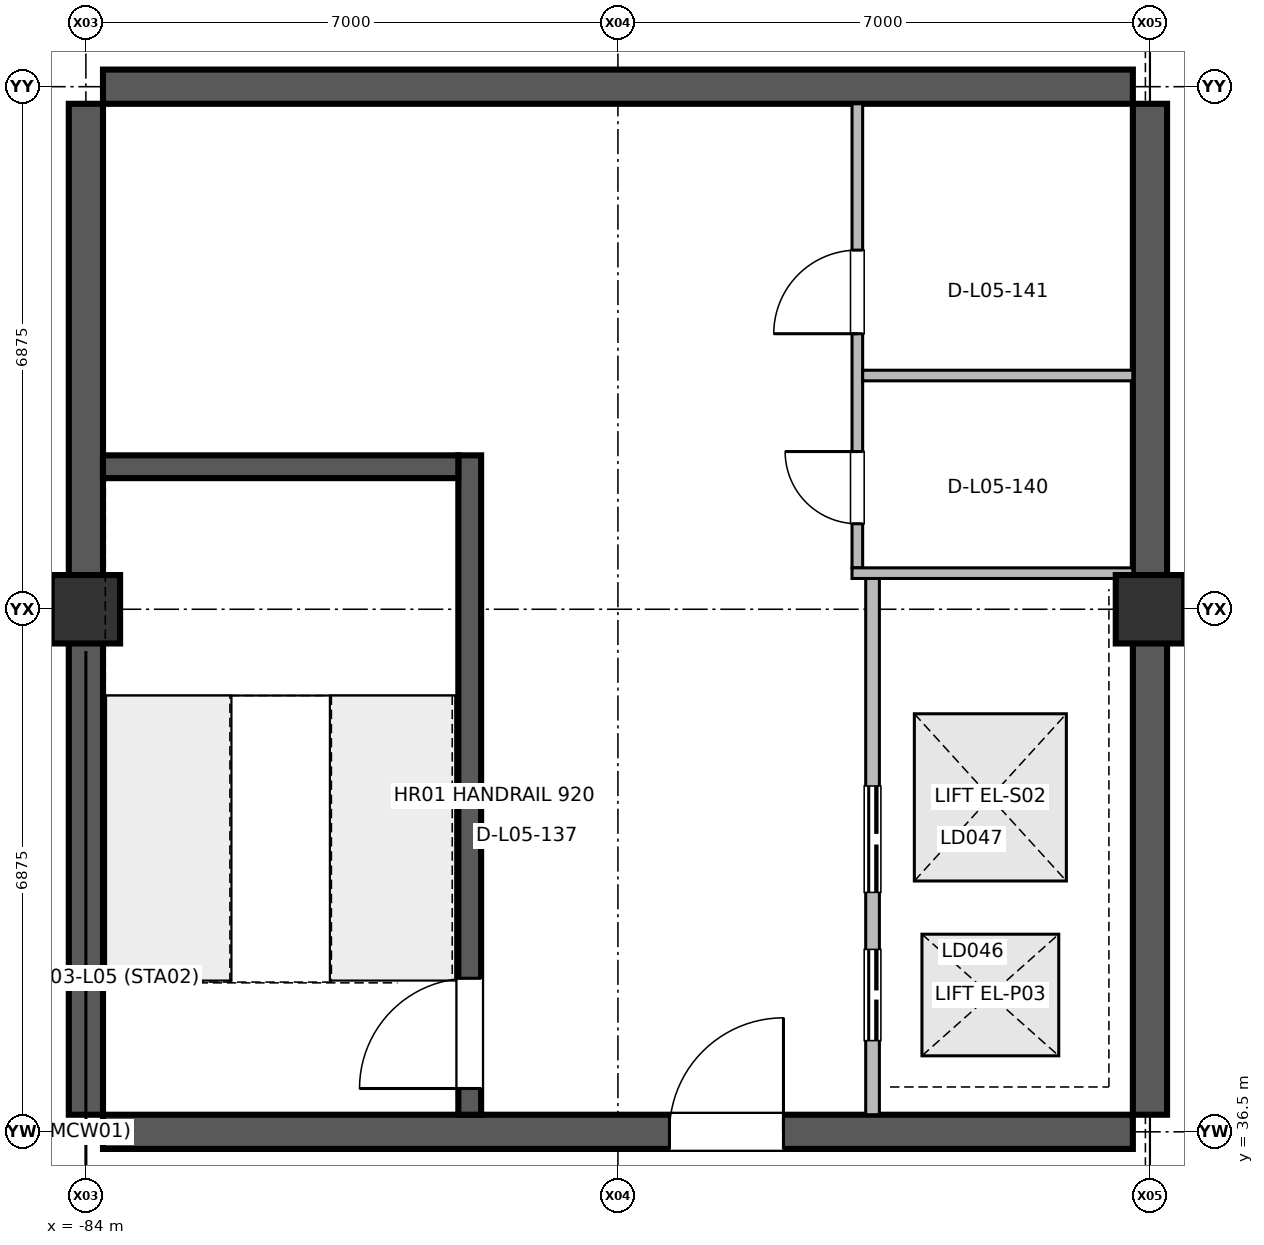
"""IFC4 building model, lengths in metres.
Left out: names, types, materials, properties, quantities, classifications, styles, units other than length and angle.
Written with IfcOpenShell. Run it as: python <this file> out.ifc"""

import sys

from ifc_helpers import new_model, si_unit, direction, frame, frame_2d, origin, origin_2d, place, context, subcontext, project, spatial, rectangle, extrude, element, fill, save


model = new_model("IFC4")
c1 = context("Model", 3, precision=1e-05, world=origin(), true_north=direction((0.0, 1.0)))
c2 = subcontext(c1, "Body", "Model", "MODEL_VIEW")
j1 = project(units=[si_unit("LENGTHUNIT", "METRE"), si_unit("PLANEANGLEUNIT", "RADIAN")], contexts=[c1])
p1 = place(None, origin())
s1 = spatial("IfcSite", under=j1, at=p1, CompositionType="ELEMENT")
p2 = place(p1, origin())
s2 = spatial("IfcBuilding", under=s1, at=p2, CompositionType="ELEMENT")
p3 = place(p2, frame((0.0, 0.0, 21.0)))
s3 = spatial("IfcBuildingStorey", under=s2, at=p3, CompositionType="ELEMENT", Elevation=21.0)
for number, where, z_axis, x_axis in (
    (1, (-84.0, 43.375, 0.0), (0.0, 0.0, 1.0), (1.0, 0.0, 0.0)),
    (2, (-70.0, 43.375, 0.0), (0.0, 0.0, 1.0), (1.0, 0.0, 0.0)),
):
    element("IfcColumn", number, at=place(p3, frame(where, z_axis=z_axis, x_axis=x_axis)), inside=s3, PredefinedType="COLUMN", context=c2, shape_type="SweptSolid", body=[
        extrude(rectangle(XDim=0.9, YDim=0.9, at=origin_2d()), origin(), (0.0, 0.0, 1.0), 5.398),
    ])
for number, where, z_axis, x_axis in (
    (3, (-84.0, 36.725, 0.0), (0.0, 0.0, 1.0), (0.0, 1.0, 0.0)),
    (4, (-70.0, 36.725, 0.0), (0.0, 0.0, 1.0), (0.0, 1.0, 0.0)),
):
    element("IfcWall", number, at=place(p3, frame(where, z_axis=z_axis, x_axis=x_axis)), inside=s3, PredefinedType="SHEAR", context=c2, shape_type="SweptSolid", body=[
        extrude(rectangle(XDim=13.3, YDim=0.45, at=frame_2d((6.65, 0.0))), origin(), (0.0, 0.0, 1.0), 5.22),
    ])
p4 = place(p3, frame((-83.775, 36.5, 0.0), z_axis=(0.0, 0.0, 1.0), x_axis=(1.0, 0.0, 0.0)))
e5 = element("IfcWall", 5, at=p4, inside=s3, PredefinedType="SHEAR", context=c2, shape_type="SweptSolid", body=[
    extrude(rectangle(XDim=13.55, YDim=0.45, at=frame_2d((6.775, 0.0))), origin(), (0.0, 0.0, 1.0), 5.22),
])
p5 = place(p4, frame((7.453, 0.0, 0.0)))
e6 = element("IfcOpeningElement", 6, at=p5, cuts=e5, PredefinedType="OPENING", context=c2, shape_type="SweptSolid", body=[
    extrude(rectangle(XDim=1.5, YDim=2.2, at=frame_2d((0.75, 1.1))), frame((0.0, 0.235, 0.0), z_axis=(0.0, -1.0, 0.0), x_axis=(1.0, 0.0, 0.0)), (0.0, 0.0, 1.0), 0.47),
])
p6 = place(p3, frame((-83.775, 50.25, 0.0), z_axis=(0.0, 0.0, 1.0), x_axis=(1.0, 0.0, 0.0)))
e7 = element("IfcWall", 7, at=p6, inside=s3, PredefinedType="SHEAR", context=c2, shape_type="SweptSolid", body=[
    extrude(rectangle(XDim=13.55, YDim=0.45, at=frame_2d((6.775, 0.0))), origin(), (0.0, 0.0, 1.0), 5.22),
])
p7 = place(p3, frame((-78.95, 36.725, 0.0), z_axis=(0.0, 0.0, 1.0), x_axis=(0.0, 1.0, 0.0)))
e8 = element("IfcWall", 8, at=p7, inside=s3, PredefinedType="SHEAR", context=c2, shape_type="SweptSolid", body=[
    extrude(rectangle(XDim=8.675, YDim=0.3, at=frame_2d((4.337, 0.0))), origin(), (0.0, 0.0, 1.0), 5.22),
])
p8 = place(p7, frame((0.345, 0.0, 0.0)))
e9 = element("IfcOpeningElement", 9, at=p8, cuts=e8, PredefinedType="OPENING", context=c2, shape_type="SweptSolid", body=[
    extrude(rectangle(XDim=1.45, YDim=2.2, at=frame_2d((0.725, 1.1))), frame((0.0, 0.16, 0.0), z_axis=(0.0, -1.0, 0.0), x_axis=(1.0, 0.0, 0.0)), (0.0, 0.0, 1.0), 0.32),
])
p9 = place(p3, frame((-73.65, 36.725, 0.0), z_axis=(0.0, 0.0, 1.0), x_axis=(0.0, 1.0, 0.0)))
e10 = element("IfcWall", 10, at=p9, inside=s3, PredefinedType="PARTITIONING", context=c2, shape_type="SweptSolid", body=[
    extrude(rectangle(XDim=7.055, YDim=0.18, at=frame_2d((3.527, 0.0))), origin(), (0.0, 0.0, 1.0), 4.42),
])
p10 = place(p9, frame((0.975, 0.0, 0.0)))
e11 = element("IfcOpeningElement", 11, at=p10, cuts=e10, PredefinedType="OPENING", context=c2, shape_type="SweptSolid", body=[
    extrude(rectangle(XDim=1.2, YDim=2.25, at=frame_2d((0.6, 1.125))), frame((0.0, 0.1, 0.0), z_axis=(0.0, -1.0, 0.0), x_axis=(1.0, 0.0, 0.0)), (0.0, 0.0, 1.0), 0.2),
])
p11 = place(p9, frame((2.925, 0.0, 0.0)))
e12 = element("IfcOpeningElement", 12, at=p11, cuts=e10, PredefinedType="OPENING", context=c2, shape_type="SweptSolid", body=[
    extrude(rectangle(XDim=1.4, YDim=2.3, at=frame_2d((0.7, 1.15))), frame((0.0, 0.1, 0.0), z_axis=(0.0, -1.0, 0.0), x_axis=(1.0, 0.0, 0.0)), (0.0, 0.0, 1.0), 0.2),
])
p12 = place(p3, frame((-73.85, 43.92, 0.0), z_axis=(0.0, 0.0, 1.0), x_axis=(0.0, 1.0, 0.0)))
e13 = element("IfcWall", 13, at=p12, inside=s3, PredefinedType="PARTITIONING", context=c2, shape_type="SweptSolid", body=[
    extrude(rectangle(XDim=6.105, YDim=0.14, at=frame_2d((3.052, 0.0))), origin(), (0.0, 0.0, 1.0), 4.42),
])
p13 = place(p12, frame((0.58, 0.0, 0.0)))
e14 = element("IfcOpeningElement", 14, at=p13, cuts=e13, PredefinedType="OPENING", context=c2, shape_type="SweptSolid", body=[
    extrude(rectangle(XDim=0.95, YDim=2.15, at=frame_2d((0.475, 1.075))), frame((0.0, 0.08, 0.0), z_axis=(0.0, -1.0, 0.0), x_axis=(1.0, 0.0, 0.0)), (0.0, 0.0, 1.0), 0.16),
])
p14 = place(p12, frame((3.08, 0.0, 0.0)))
e15 = element("IfcOpeningElement", 15, at=p14, cuts=e13, PredefinedType="OPENING", context=c2, shape_type="SweptSolid", body=[
    extrude(rectangle(XDim=1.1, YDim=2.15, at=frame_2d((0.55, 1.075))), frame((0.0, 0.08, 0.0), z_axis=(0.0, -1.0, 0.0), x_axis=(1.0, 0.0, 0.0)), (0.0, 0.0, 1.0), 0.16),
])
p15 = place(p3, frame((-73.92, 43.85, 0.0), z_axis=(0.0, 0.0, 1.0), x_axis=(1.0, 0.0, 0.0)))
e16 = element("IfcWall", 16, at=p15, inside=s3, PredefinedType="PARTITIONING", context=c2, shape_type="SweptSolid", body=[
    extrude(rectangle(XDim=3.695, YDim=0.14, at=frame_2d((1.847, 0.0))), origin(), (0.0, 0.0, 1.0), 4.42),
])
p16 = place(p3, frame((-73.78, 46.45, 0.0), z_axis=(0.0, 0.0, 1.0), x_axis=(1.0, 0.0, 0.0)))
e17 = element("IfcWall", 17, at=p16, inside=s3, PredefinedType="PARTITIONING", context=c2, shape_type="SweptSolid", body=[
    extrude(rectangle(XDim=3.555, YDim=0.14, at=frame_2d((1.777, 0.0))), origin(), (0.0, 0.0, 1.0), 4.42),
])
p17 = place(p3, frame((-83.775, 45.25, 0.0), z_axis=(0.0, 0.0, 1.0), x_axis=(1.0, 0.0, 0.0)))
e18 = element("IfcWall", 18, at=p17, inside=s3, PredefinedType="SHEAR", context=c2, shape_type="SweptSolid", body=[
    extrude(rectangle(XDim=4.675, YDim=0.3, at=frame_2d((2.337, 0.0))), origin(), (0.0, 0.0, 1.0), 5.22),
])
p18 = place(p5, origin())
e19 = element("IfcDoor", 19, at=p18, inside=s3, OperationType="SINGLE_SWING_RIGHT", PredefinedType="DOOR", context=c2, shape_type="SweptSolid", body=[
    extrude(rectangle(XDim=1.5, YDim=2.2, at=frame_2d((0.75, 1.1))), frame((0.0, 0.025, 0.0), z_axis=(0.0, -1.0, 0.0), x_axis=(1.0, 0.0, 0.0)), (0.0, 0.0, 1.0), 0.05),
])
fill(e6, e19)
p19 = place(p8, origin())
e20 = element("IfcDoor", 20, at=p19, inside=s3, OperationType="SINGLE_SWING_LEFT", PredefinedType="DOOR", context=c2, shape_type="SweptSolid", body=[
    extrude(rectangle(XDim=1.45, YDim=2.2, at=frame_2d((0.725, 1.1))), frame((0.0, 0.025, 0.0), z_axis=(0.0, -1.0, 0.0), x_axis=(1.0, 0.0, 0.0)), (0.0, 0.0, 1.0), 0.05),
])
fill(e9, e20)
p20 = place(p10, origin())
e21 = element("IfcDoor", 21, at=p20, inside=s3, OperationType="DOUBLE_DOOR_SLIDING", PredefinedType="DOOR", context=c2, shape_type="SweptSolid", body=[
    extrude(rectangle(XDim=1.2, YDim=2.25, at=frame_2d((0.6, 1.125))), frame((0.0, 0.025, 0.0), z_axis=(0.0, -1.0, 0.0), x_axis=(1.0, 0.0, 0.0)), (0.0, 0.0, 1.0), 0.05),
])
fill(e11, e21)
p21 = place(p11, origin())
e22 = element("IfcDoor", 22, at=p21, inside=s3, OperationType="DOUBLE_DOOR_SLIDING", PredefinedType="DOOR", context=c2, shape_type="SweptSolid", body=[
    extrude(rectangle(XDim=1.4, YDim=2.3, at=frame_2d((0.7, 1.15))), frame((0.0, 0.025, 0.0), z_axis=(0.0, -1.0, 0.0), x_axis=(1.0, 0.0, 0.0)), (0.0, 0.0, 1.0), 0.05),
])
fill(e12, e22)
p22 = place(p13, origin())
e23 = element("IfcDoor", 23, at=p22, inside=s3, OperationType="SINGLE_SWING_RIGHT", PredefinedType="DOOR", context=c2, shape_type="SweptSolid", body=[
    extrude(rectangle(XDim=0.95, YDim=2.15, at=frame_2d((0.475, 1.075))), frame((0.0, 0.025, 0.0), z_axis=(0.0, -1.0, 0.0), x_axis=(1.0, 0.0, 0.0)), (0.0, 0.0, 1.0), 0.05),
])
fill(e14, e23)
p23 = place(p14, origin())
e24 = element("IfcDoor", 24, at=p23, inside=s3, OperationType="SINGLE_SWING_LEFT", PredefinedType="DOOR", context=c2, shape_type="SweptSolid", body=[
    extrude(rectangle(XDim=1.1, YDim=2.15, at=frame_2d((0.55, 1.075))), frame((0.0, 0.025, 0.0), z_axis=(0.0, -1.0, 0.0), x_axis=(1.0, 0.0, 0.0)), (0.0, 0.0, 1.0), 0.05),
])
fill(e15, e24)
save(model, sys.argv[1])
